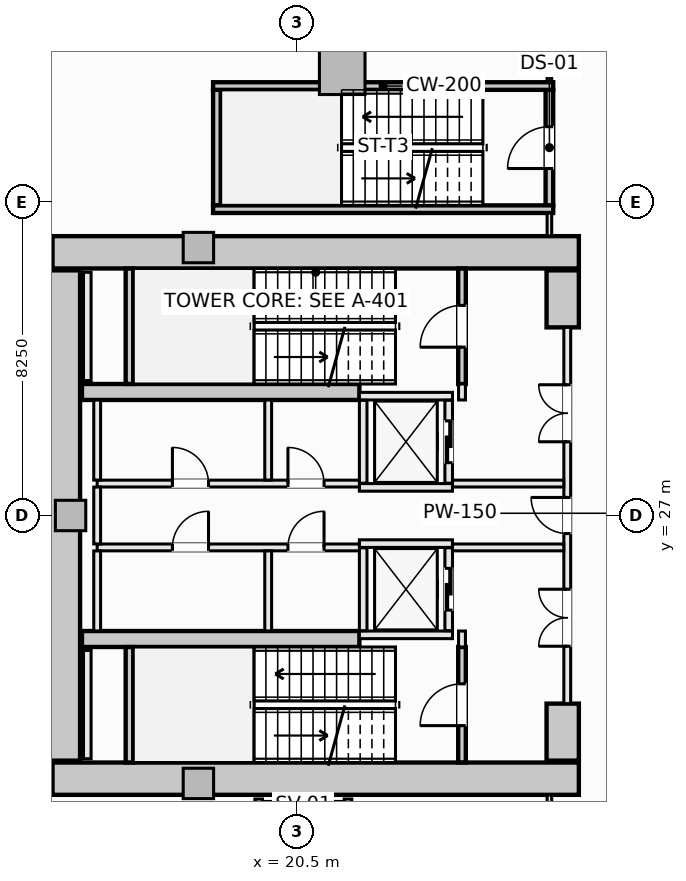
"""IFC4 building model, lengths in metres.
Left out: names, types, materials, properties, quantities, classifications, styles, units other than length and angle.
Written with IfcOpenShell. Run it as: python <this file> out.ifc"""

import sys

from ifc_helpers import new_model, si_unit, direction, frame, frame_2d, origin, origin_2d, place, context, subcontext, project, spatial, rectangle, extrude, element, fill, save


model = new_model("IFC4")
c1 = context("Model", 3, precision=1e-05, world=origin(), true_north=direction((0.0, 1.0)))
c2 = subcontext(c1, "Body", "Model", "MODEL_VIEW")
j1 = project(units=[si_unit("LENGTHUNIT", "METRE"), si_unit("PLANEANGLEUNIT", "RADIAN")], contexts=[c1])
p1 = place(None, origin())
s1 = spatial("IfcSite", under=j1, at=p1, CompositionType="ELEMENT")
p2 = place(p1, origin())
s2 = spatial("IfcBuilding", under=s1, at=p2, CompositionType="ELEMENT")
p3 = place(p2, frame((0.0, 0.0, -13.5)))
s3 = spatial("IfcBuildingStorey", under=s2, at=p3, CompositionType="ELEMENT", Elevation=-13.5)
for number, where, z_axis, x_axis in (
    (1, (14.075, 33.925, -0.5), (0.0, 0.0, 1.0), (1.0, 0.0, 0.0)),
    (2, (14.075, 20.075, -0.5), (0.0, 0.0, 1.0), (1.0, 0.0, 0.0)),
):
    element("IfcWall", number, at=place(p3, frame(where, z_axis=z_axis, x_axis=x_axis)), inside=s3, PredefinedType="SHEAR", context=c2, shape_type="SweptSolid", body=[
        extrude(rectangle(XDim=13.85, YDim=0.85, at=frame_2d((6.925, 0.0))), origin(), (0.0, 0.0, 1.0), 4.68),
    ])
p4 = place(p3, frame((14.375, 20.55, -0.5), z_axis=(0.0, 0.0, 1.0), x_axis=(0.0, 1.0, 0.0)))
e3 = element("IfcWall", 3, at=p4, inside=s3, PredefinedType="SHEAR", context=c2, shape_type="SweptSolid", body=[
    extrude(rectangle(XDim=12.9, YDim=0.85, at=frame_2d((6.45, 0.0))), origin(), (0.0, 0.0, 1.0), 4.68),
])
for number, where, z_axis, x_axis in (
    (4, (27.5, 31.95, -0.5), (0.0, 0.0, 1.0), (0.0, 1.0, 0.0)),
    (5, (27.5, 20.55, -0.5), (0.0, 0.0, 1.0), (0.0, 1.0, 0.0)),
):
    element("IfcWall", number, at=place(p3, frame(where, z_axis=z_axis, x_axis=x_axis)), inside=s3, PredefinedType="SHEAR", context=c2, shape_type="SweptSolid", body=[
        extrude(rectangle(XDim=1.5, YDim=0.85, at=frame_2d((0.75, 0.0))), origin(), (0.0, 0.0, 1.0), 4.68),
    ])
for number, where, z_axis, x_axis in (
    (6, (14.85, 30.25, -0.5), (0.0, 0.0, 1.0), (1.0, 0.0, 0.0)),
    (7, (14.85, 23.75, -0.5), (0.0, 0.0, 1.0), (1.0, 0.0, 0.0)),
):
    element("IfcWall", number, at=place(p3, frame(where, z_axis=z_axis, x_axis=x_axis)), inside=s3, PredefinedType="SHEAR", context=c2, shape_type="SweptSolid", body=[
        extrude(rectangle(XDim=7.3, YDim=0.42, at=frame_2d((3.65, 0.0))), origin(), (0.0, 0.0, 1.0), 4.68),
    ])
p5 = place(p3, frame((21.698, 38.677, -0.5), z_axis=(0.0, 0.0, 1.0), x_axis=(1.0, 0.0, 0.0)))
e8 = element("IfcColumn", 8, at=p5, inside=s3, PredefinedType="COLUMN", context=c2, shape_type="SweptSolid", body=[
    extrude(rectangle(XDim=1.2, YDim=1.2, at=origin_2d()), origin(), (0.0, 0.0, 1.0), 4.68),
])
for number, where, z_axis, x_axis in (
    (9, (17.914, 34.05, -0.5), (0.0, 0.0, 1.0), (1.0, 0.0, 0.0)),
    (10, (14.55, 27.0, -0.5), (0.0, 0.0, 1.0), (1.0, 0.0, 0.0)),
    (11, (17.914, 19.95, -0.5), (0.0, 0.0, 1.0), (1.0, 0.0, 0.0)),
):
    element("IfcColumn", number, at=place(p3, frame(where, z_axis=z_axis, x_axis=x_axis)), inside=s3, PredefinedType="PILASTER", context=c2, shape_type="SweptSolid", body=[
        extrude(rectangle(XDim=0.8, YDim=0.8, at=origin_2d()), origin(), (0.0, 0.0, 1.0), 4.68),
    ])
p6 = place(p3, frame((24.85, 30.46, -0.5), z_axis=(0.0, 0.0, 1.0), x_axis=(0.0, 1.0, 0.0)))
e12 = element("IfcWall", 12, at=p6, inside=s3, PredefinedType="SHEAR", context=c2, shape_type="SweptSolid", body=[
    extrude(rectangle(XDim=3.038, YDim=0.2, at=frame_2d((1.519, 0.0))), origin(), (0.0, 0.0, 1.0), 4.68),
])
p7 = place(p6, frame((0.969, 0.0, 0.5)))
e13 = element("IfcOpeningElement", 13, at=p7, cuts=e12, PredefinedType="OPENING", context=c2, shape_type="SweptSolid", body=[
    extrude(rectangle(XDim=1.1, YDim=2.15, at=frame_2d((0.55, 1.075))), frame((0.0, 0.11, 0.0), z_axis=(0.0, -1.0, 0.0), x_axis=(1.0, 0.0, 0.0)), (0.0, 0.0, 1.0), 0.22),
])
p8 = place(p3, frame((16.1, 30.462, -0.5), z_axis=(0.0, 0.0, 1.0), x_axis=(0.0, 1.0, 0.0)))
e14 = element("IfcWall", 14, at=p8, inside=s3, PredefinedType="SHEAR", context=c2, shape_type="SweptSolid", body=[
    extrude(rectangle(XDim=3.036, YDim=0.2, at=frame_2d((1.518, 0.0))), origin(), (0.0, 0.0, 1.0), 4.68),
])
p9 = place(p3, frame((24.85, 20.502, -0.5), z_axis=(0.0, 0.0, 1.0), x_axis=(0.0, 1.0, 0.0)))
e15 = element("IfcWall", 15, at=p9, inside=s3, PredefinedType="SHEAR", context=c2, shape_type="SweptSolid", body=[
    extrude(rectangle(XDim=3.038, YDim=0.2, at=frame_2d((1.519, 0.0))), origin(), (0.0, 0.0, 1.0), 4.68),
])
p10 = place(p9, frame((0.969, 0.0, 0.5)))
e16 = element("IfcOpeningElement", 16, at=p10, cuts=e15, PredefinedType="OPENING", context=c2, shape_type="SweptSolid", body=[
    extrude(rectangle(XDim=1.1, YDim=2.15, at=frame_2d((0.55, 1.075))), frame((0.0, 0.11, 0.0), z_axis=(0.0, -1.0, 0.0), x_axis=(1.0, 0.0, 0.0)), (0.0, 0.0, 1.0), 0.22),
])
p11 = place(p3, frame((16.1, 20.502, -0.5), z_axis=(0.0, 0.0, 1.0), x_axis=(0.0, 1.0, 0.0)))
e17 = element("IfcWall", 17, at=p11, inside=s3, PredefinedType="SHEAR", context=c2, shape_type="SweptSolid", body=[
    extrude(rectangle(XDim=3.036, YDim=0.2, at=frame_2d((1.518, 0.0))), origin(), (0.0, 0.0, 1.0), 4.68),
])
p12 = place(p3, frame((27.15, 35.16, -0.5), z_axis=(0.0, 0.0, 1.0), x_axis=(0.0, 1.0, 0.0)))
e18 = element("IfcWall", 18, at=p12, inside=s3, PredefinedType="SHEAR", context=c2, shape_type="SweptSolid", body=[
    extrude(rectangle(XDim=3.04, YDim=0.2, at=frame_2d((1.52, 0.0))), origin(), (0.0, 0.0, 1.0), 4.68),
])
p13 = place(p12, frame((0.97, 0.0, 0.5)))
e19 = element("IfcOpeningElement", 19, at=p13, cuts=e18, PredefinedType="OPENING", context=c2, shape_type="SweptSolid", body=[
    extrude(rectangle(XDim=1.1, YDim=2.15, at=frame_2d((0.55, 1.075))), frame((0.0, 0.11, 0.0), z_axis=(0.0, -1.0, 0.0), x_axis=(1.0, 0.0, 0.0)), (0.0, 0.0, 1.0), 0.22),
])
p14 = place(p3, frame((18.4, 35.16, -0.5), z_axis=(0.0, 0.0, 1.0), x_axis=(0.0, 1.0, 0.0)))
e20 = element("IfcWall", 20, at=p14, inside=s3, PredefinedType="SHEAR", context=c2, shape_type="SweptSolid", body=[
    extrude(rectangle(XDim=3.04, YDim=0.2, at=frame_2d((1.52, 0.0))), origin(), (0.0, 0.0, 1.0), 4.68),
])
for number, where, z_axis, x_axis in (
    (21, (18.3, 38.3, -0.5), (0.0, 0.0, 1.0), (1.0, 0.0, 0.0)),
    (22, (18.3, 35.06, -0.5), (0.0, 0.0, 1.0), (1.0, 0.0, 0.0)),
):
    element("IfcWall", number, at=place(p3, frame(where, z_axis=z_axis, x_axis=x_axis)), inside=s3, PredefinedType="SHEAR", context=c2, shape_type="SweptSolid", body=[
        extrude(rectangle(XDim=8.95, YDim=0.2, at=frame_2d((4.475, 0.0))), origin(), (0.0, 0.0, 1.0), 4.68),
    ])
for number, where, z_axis, x_axis in (
    (23, (22.15, 30.14, 0.0), (0.0, 0.0, 1.0), (1.0, 0.0, 0.0)),
    (24, (22.15, 27.74, 0.0), (0.0, 0.0, 1.0), (1.0, 0.0, 0.0)),
):
    element("IfcWall", number, at=place(p3, frame(where, z_axis=z_axis, x_axis=x_axis)), inside=s3, PredefinedType="SOLIDWALL", context=c2, shape_type="SweptSolid", body=[
        extrude(rectangle(XDim=2.45, YDim=0.2, at=frame_2d((1.225, 0.0))), origin(), (0.0, 0.0, 1.0), 4.18),
    ])
p15 = place(p3, frame((22.25, 27.85, 0.0), z_axis=(0.0, 0.0, 1.0), x_axis=(0.0, 1.0, 0.0)))
e25 = element("IfcWall", 25, at=p15, inside=s3, PredefinedType="SOLIDWALL", context=c2, shape_type="SweptSolid", body=[
    extrude(rectangle(XDim=2.18, YDim=0.2, at=frame_2d((1.09, 0.0))), origin(), (0.0, 0.0, 1.0), 4.18),
])
p16 = place(p3, frame((24.5, 27.85, 0.0), z_axis=(0.0, 0.0, 1.0), x_axis=(0.0, 1.0, 0.0)))
e26 = element("IfcWall", 26, at=p16, inside=s3, PredefinedType="SOLIDWALL", context=c2, shape_type="SweptSolid", body=[
    extrude(rectangle(XDim=2.18, YDim=0.2, at=frame_2d((1.09, 0.0))), origin(), (0.0, 0.0, 1.0), 4.18),
])
p17 = place(p16, frame((0.54, 0.0, 0.0)))
e27 = element("IfcOpeningElement", 27, at=p17, cuts=e26, PredefinedType="OPENING", context=c2, shape_type="SweptSolid", body=[
    extrude(rectangle(XDim=1.1, YDim=2.2, at=frame_2d((0.55, 1.1))), frame((0.0, 0.11, 0.0), z_axis=(0.0, -1.0, 0.0), x_axis=(1.0, 0.0, 0.0)), (0.0, 0.0, 1.0), 0.22),
])
for number, where, z_axis, x_axis in (
    (28, (22.15, 26.26, 0.0), (0.0, 0.0, 1.0), (1.0, 0.0, 0.0)),
    (29, (22.15, 23.86, 0.0), (0.0, 0.0, 1.0), (1.0, 0.0, 0.0)),
):
    element("IfcWall", number, at=place(p3, frame(where, z_axis=z_axis, x_axis=x_axis)), inside=s3, PredefinedType="SOLIDWALL", context=c2, shape_type="SweptSolid", body=[
        extrude(rectangle(XDim=2.45, YDim=0.2, at=frame_2d((1.225, 0.0))), origin(), (0.0, 0.0, 1.0), 4.18),
    ])
p18 = place(p3, frame((22.25, 23.97, 0.0), z_axis=(0.0, 0.0, 1.0), x_axis=(0.0, 1.0, 0.0)))
e30 = element("IfcWall", 30, at=p18, inside=s3, PredefinedType="SOLIDWALL", context=c2, shape_type="SweptSolid", body=[
    extrude(rectangle(XDim=2.18, YDim=0.2, at=frame_2d((1.09, 0.0))), origin(), (0.0, 0.0, 1.0), 4.18),
])
p19 = place(p3, frame((24.5, 23.97, 0.0), z_axis=(0.0, 0.0, 1.0), x_axis=(0.0, 1.0, 0.0)))
e31 = element("IfcWall", 31, at=p19, inside=s3, PredefinedType="SOLIDWALL", context=c2, shape_type="SweptSolid", body=[
    extrude(rectangle(XDim=2.18, YDim=0.2, at=frame_2d((1.09, 0.0))), origin(), (0.0, 0.0, 1.0), 4.18),
])
p20 = place(p19, frame((0.54, 0.0, 0.0)))
e32 = element("IfcOpeningElement", 32, at=p20, cuts=e31, PredefinedType="OPENING", context=c2, shape_type="SweptSolid", body=[
    extrude(rectangle(XDim=1.1, YDim=2.2, at=frame_2d((0.55, 1.1))), frame((0.0, 0.11, 0.0), z_axis=(0.0, -1.0, 0.0), x_axis=(1.0, 0.0, 0.0)), (0.0, 0.0, 1.0), 0.22),
])
for number, where, z_axis, x_axis in (
    (33, (19.5, 17.01, 0.0), (0.0, 0.0, 1.0), (0.0, 1.0, 0.0)),
    (34, (21.85, 17.01, 0.0), (0.0, 0.0, 1.0), (0.0, 1.0, 0.0)),
):
    element("IfcWall", number, at=place(p3, frame(where, z_axis=z_axis, x_axis=x_axis)), inside=s3, PredefinedType="SOLIDWALL", context=c2, shape_type="SweptSolid", body=[
        extrude(rectangle(XDim=2.53, YDim=0.2, at=frame_2d((1.265, 0.0))), origin(), (0.0, 0.0, 1.0), 4.18),
    ])
for number, where, z_axis, x_axis in (
    (35, (14.99, 30.55, 0.0), (0.0, 0.0, 1.0), (0.0, 1.0, 0.0)),
    (36, (14.99, 20.6, 0.0), (0.0, 0.0, 1.0), (0.0, 1.0, 0.0)),
):
    element("IfcWall", number, at=place(p3, frame(where, z_axis=z_axis, x_axis=x_axis)), inside=s3, PredefinedType="SOLIDWALL", context=c2, shape_type="SweptSolid", body=[
        extrude(rectangle(XDim=2.85, YDim=0.2, at=frame_2d((1.425, 0.0))), origin(), (0.0, 0.0, 1.0), 4.18),
    ])
for number, where, z_axis, x_axis in (
    (37, (24.85, 23.54, 0.0), (0.0, 0.0, 1.0), (0.0, 1.0, 0.0)),
    (38, (24.85, 30.04, 0.0), (0.0, 0.0, 1.0), (0.0, 1.0, 0.0)),
):
    element("IfcWall", number, at=place(p3, frame(where, z_axis=z_axis, x_axis=x_axis)), inside=s3, PredefinedType="SOLIDWALL", context=c2, shape_type="SweptSolid", body=[
        extrude(rectangle(XDim=0.42, YDim=0.18, at=frame_2d((0.21, 0.0))), origin(), (0.0, 0.0, 1.0), 4.18),
    ])
p21 = place(p3, frame((27.62, 22.05, 0.0), z_axis=(0.0, 0.0, 1.0), x_axis=(0.0, 1.0, 0.0)))
e39 = element("IfcWall", 39, at=p21, inside=s3, PredefinedType="SOLIDWALL", context=c2, shape_type="SweptSolid", body=[
    extrude(rectangle(XDim=9.9, YDim=0.18, at=frame_2d((4.95, 0.0))), origin(), (0.0, 0.0, 1.0), 3.272),
])
p22 = place(p21, frame((4.475, 0.0, 0.0)))
e40 = element("IfcOpeningElement", 40, at=p22, cuts=e39, PredefinedType="OPENING", context=c2, shape_type="SweptSolid", body=[
    extrude(rectangle(XDim=0.95, YDim=2.1, at=frame_2d((0.475, 1.05))), frame((0.0, 0.1, 0.0), z_axis=(0.0, -1.0, 0.0), x_axis=(1.0, 0.0, 0.0)), (0.0, 0.0, 1.0), 0.2),
])
p23 = place(p21, frame((6.89, 0.0, 0.0)))
e41 = element("IfcOpeningElement", 41, at=p23, cuts=e39, PredefinedType="OPENING", context=c2, shape_type="SweptSolid", body=[
    extrude(rectangle(XDim=1.5, YDim=2.2, at=frame_2d((0.75, 1.1))), frame((0.0, 0.1, 0.0), z_axis=(0.0, -1.0, 0.0), x_axis=(1.0, 0.0, 0.0)), (0.0, 0.0, 1.0), 0.2),
])
p24 = place(p21, frame((1.51, 0.0, 0.0)))
e42 = element("IfcOpeningElement", 42, at=p24, cuts=e39, PredefinedType="OPENING", context=c2, shape_type="SweptSolid", body=[
    extrude(rectangle(XDim=1.5, YDim=2.2, at=frame_2d((0.75, 1.1))), frame((0.0, 0.1, 0.0), z_axis=(0.0, -1.0, 0.0), x_axis=(1.0, 0.0, 0.0)), (0.0, 0.0, 1.0), 0.2),
])
p25 = place(p3, frame((15.25, 27.84, 0.0), z_axis=(0.0, 0.0, 1.0), x_axis=(1.0, 0.0, 0.0)))
e43 = element("IfcWall", 43, at=p25, inside=s3, PredefinedType="SOLIDWALL", context=c2, shape_type="SweptSolid", body=[
    extrude(rectangle(XDim=6.9, YDim=0.18, at=frame_2d((3.45, 0.0))), origin(), (0.0, 0.0, 1.0), 4.18),
])
p26 = place(p25, frame((5.02, 0.0, 0.0)))
e44 = element("IfcOpeningElement", 44, at=p26, cuts=e43, PredefinedType="OPENING", context=c2, shape_type="SweptSolid", body=[
    extrude(rectangle(XDim=0.95, YDim=2.1, at=frame_2d((0.475, 1.05))), frame((0.0, 0.1, 0.0), z_axis=(0.0, -1.0, 0.0), x_axis=(1.0, 0.0, 0.0)), (0.0, 0.0, 1.0), 0.2),
])
p27 = place(p25, frame((1.98, 0.0, 0.0)))
e45 = element("IfcOpeningElement", 45, at=p27, cuts=e43, PredefinedType="OPENING", context=c2, shape_type="SweptSolid", body=[
    extrude(rectangle(XDim=0.95, YDim=2.1, at=frame_2d((0.475, 1.05))), frame((0.0, 0.1, 0.0), z_axis=(0.0, -1.0, 0.0), x_axis=(1.0, 0.0, 0.0)), (0.0, 0.0, 1.0), 0.2),
])
p28 = place(p3, frame((24.6, 27.84, 0.0), z_axis=(0.0, 0.0, 1.0), x_axis=(1.0, 0.0, 0.0)))
e46 = element("IfcWall", 46, at=p28, inside=s3, PredefinedType="SOLIDWALL", context=c2, shape_type="SweptSolid", body=[
    extrude(rectangle(XDim=2.928, YDim=0.18, at=frame_2d((1.464, 0.0))), origin(), (0.0, 0.0, 1.0), 4.18),
])
p29 = place(p3, frame((15.25, 26.16, 0.0), z_axis=(0.0, 0.0, 1.0), x_axis=(1.0, 0.0, 0.0)))
e47 = element("IfcWall", 47, at=p29, inside=s3, PredefinedType="SOLIDWALL", context=c2, shape_type="SweptSolid", body=[
    extrude(rectangle(XDim=6.9, YDim=0.18, at=frame_2d((3.45, 0.0))), origin(), (0.0, 0.0, 1.0), 4.18),
])
p30 = place(p29, frame((5.02, 0.0, 0.0)))
e48 = element("IfcOpeningElement", 48, at=p30, cuts=e47, PredefinedType="OPENING", context=c2, shape_type="SweptSolid", body=[
    extrude(rectangle(XDim=0.95, YDim=2.1, at=frame_2d((0.475, 1.05))), frame((0.0, 0.1, 0.0), z_axis=(0.0, -1.0, 0.0), x_axis=(1.0, 0.0, 0.0)), (0.0, 0.0, 1.0), 0.2),
])
p31 = place(p29, frame((1.98, 0.0, 0.0)))
e49 = element("IfcOpeningElement", 49, at=p31, cuts=e47, PredefinedType="OPENING", context=c2, shape_type="SweptSolid", body=[
    extrude(rectangle(XDim=0.95, YDim=2.1, at=frame_2d((0.475, 1.05))), frame((0.0, 0.1, 0.0), z_axis=(0.0, -1.0, 0.0), x_axis=(1.0, 0.0, 0.0)), (0.0, 0.0, 1.0), 0.2),
])
p32 = place(p3, frame((24.6, 26.16, 0.0), z_axis=(0.0, 0.0, 1.0), x_axis=(1.0, 0.0, 0.0)))
e50 = element("IfcWall", 50, at=p32, inside=s3, PredefinedType="SOLIDWALL", context=c2, shape_type="SweptSolid", body=[
    extrude(rectangle(XDim=2.928, YDim=0.18, at=frame_2d((1.464, 0.0))), origin(), (0.0, 0.0, 1.0), 4.18),
])
p33 = place(p3, frame((15.25, 23.962, 0.0), z_axis=(0.0, 0.0, 1.0), x_axis=(0.0, 1.0, 0.0)))
e51 = element("IfcWall", 51, at=p33, inside=s3, PredefinedType="SOLIDWALL", context=c2, shape_type="SweptSolid", body=[
    extrude(rectangle(XDim=2.106, YDim=0.18, at=frame_2d((1.053, 0.0))), origin(), (0.0, 0.0, 1.0), 4.18),
])
p34 = place(p3, frame((15.25, 26.252, 0.0), z_axis=(0.0, 0.0, 1.0), x_axis=(0.0, 1.0, 0.0)))
e52 = element("IfcWall", 52, at=p34, inside=s3, PredefinedType="SOLIDWALL", context=c2, shape_type="SweptSolid", body=[
    extrude(rectangle(XDim=1.496, YDim=0.18, at=frame_2d((0.748, 0.0))), origin(), (0.0, 0.0, 1.0), 4.18),
])
for number, where, z_axis, x_axis in (
    (53, (15.25, 27.932, 0.0), (0.0, 0.0, 1.0), (0.0, 1.0, 0.0)),
    (54, (19.75, 23.962, 0.0), (0.0, 0.0, 1.0), (0.0, 1.0, 0.0)),
    (55, (19.75, 27.932, 0.0), (0.0, 0.0, 1.0), (0.0, 1.0, 0.0)),
):
    element("IfcWall", number, at=place(p3, frame(where, z_axis=z_axis, x_axis=x_axis)), inside=s3, PredefinedType="SOLIDWALL", context=c2, shape_type="SweptSolid", body=[
        extrude(rectangle(XDim=2.106, YDim=0.18, at=frame_2d((1.053, 0.0))), origin(), (0.0, 0.0, 1.0), 4.18),
    ])
p35 = place(p3, frame((27.15, 17.112, 0.0), z_axis=(0.0, 0.0, 1.0), x_axis=(0.0, 1.0, 0.0)))
e56 = element("IfcWall", 56, at=p35, inside=s3, PredefinedType="PARTITIONING", context=c2, shape_type="SweptSolid", body=[
    extrude(rectangle(XDim=2.536, YDim=0.12, at=frame_2d((1.268, 0.0))), origin(), (0.0, 0.0, 1.0), 4.18),
])
p36 = place(p3, frame((27.15, 34.352, 0.0), z_axis=(0.0, 0.0, 1.0), x_axis=(0.0, 1.0, 0.0)))
e57 = element("IfcWall", 57, at=p36, inside=s3, PredefinedType="PARTITIONING", context=c2, shape_type="SweptSolid", body=[
    extrude(rectangle(XDim=0.606, YDim=0.12, at=frame_2d((0.303, 0.0))), origin(), (0.0, 0.0, 1.0), 4.18),
])
p37 = place(p3, frame((27.15, 38.402, 0.0), z_axis=(0.0, 0.0, 1.0), x_axis=(0.0, 1.0, 0.0)))
e58 = element("IfcWall", 58, at=p37, inside=s3, PredefinedType="PARTITIONING", context=c2, shape_type="SweptSolid", body=[
    extrude(rectangle(XDim=12.398, YDim=0.12, at=frame_2d((6.199, 0.0))), origin(), (0.0, 0.0, 1.0), 4.18),
])
p38 = place(p37, frame((4.629, 0.0, 0.0)))
e59 = element("IfcOpeningElement", 59, at=p38, cuts=e58, PredefinedType="OPENING", context=c2, shape_type="SweptSolid", body=[
    extrude(rectangle(XDim=0.95, YDim=2.1, at=frame_2d((0.475, 1.05))), frame((0.0, 0.07, 0.0), z_axis=(0.0, -1.0, 0.0), x_axis=(1.0, 0.0, 0.0)), (0.0, 0.0, 1.0), 0.14),
])
p39 = place(p7, origin())
e60 = element("IfcDoor", 60, at=p39, inside=s3, OperationType="SINGLE_SWING_LEFT", PredefinedType="DOOR", context=c2, shape_type="SweptSolid", body=[
    extrude(rectangle(XDim=1.1, YDim=2.15, at=frame_2d((0.55, 1.075))), frame((0.0, 0.025, 0.0), z_axis=(0.0, -1.0, 0.0), x_axis=(1.0, 0.0, 0.0)), (0.0, 0.0, 1.0), 0.05),
])
fill(e13, e60)
p40 = place(p10, origin())
e61 = element("IfcDoor", 61, at=p40, inside=s3, OperationType="SINGLE_SWING_LEFT", PredefinedType="DOOR", context=c2, shape_type="SweptSolid", body=[
    extrude(rectangle(XDim=1.1, YDim=2.15, at=frame_2d((0.55, 1.075))), frame((0.0, 0.025, 0.0), z_axis=(0.0, -1.0, 0.0), x_axis=(1.0, 0.0, 0.0)), (0.0, 0.0, 1.0), 0.05),
])
fill(e16, e61)
p41 = place(p13, origin())
e62 = element("IfcDoor", 62, at=p41, inside=s3, OperationType="SINGLE_SWING_LEFT", PredefinedType="DOOR", context=c2, shape_type="SweptSolid", body=[
    extrude(rectangle(XDim=1.1, YDim=2.15, at=frame_2d((0.55, 1.075))), frame((0.0, 0.025, 0.0), z_axis=(0.0, -1.0, 0.0), x_axis=(1.0, 0.0, 0.0)), (0.0, 0.0, 1.0), 0.05),
])
fill(e19, e62)
p42 = place(p17, origin())
e63 = element("IfcDoor", 63, at=p42, inside=s3, OperationType="SLIDING_TO_LEFT", PredefinedType="DOOR", context=c2, shape_type="SweptSolid", body=[
    extrude(rectangle(XDim=1.1, YDim=2.2, at=frame_2d((0.55, 1.1))), frame((0.0, 0.025, 0.0), z_axis=(0.0, -1.0, 0.0), x_axis=(1.0, 0.0, 0.0)), (0.0, 0.0, 1.0), 0.05),
])
fill(e27, e63)
p43 = place(p20, origin())
e64 = element("IfcDoor", 64, at=p43, inside=s3, OperationType="SLIDING_TO_LEFT", PredefinedType="DOOR", context=c2, shape_type="SweptSolid", body=[
    extrude(rectangle(XDim=1.1, YDim=2.2, at=frame_2d((0.55, 1.1))), frame((0.0, 0.025, 0.0), z_axis=(0.0, -1.0, 0.0), x_axis=(1.0, 0.0, 0.0)), (0.0, 0.0, 1.0), 0.05),
])
fill(e32, e64)
p44 = place(p22, origin())
e65 = element("IfcDoor", 65, at=p44, inside=s3, OperationType="SINGLE_SWING_RIGHT", PredefinedType="DOOR", context=c2, shape_type="SweptSolid", body=[
    extrude(rectangle(XDim=0.95, YDim=2.1, at=frame_2d((0.475, 1.05))), frame((0.0, 0.025, 0.0), z_axis=(0.0, -1.0, 0.0), x_axis=(1.0, 0.0, 0.0)), (0.0, 0.0, 1.0), 0.05),
])
fill(e40, e65)
p45 = place(p23, origin())
e66 = element("IfcDoor", 66, at=p45, inside=s3, OperationType="DOUBLE_DOOR_SINGLE_SWING", PredefinedType="DOOR", context=c2, shape_type="SweptSolid", body=[
    extrude(rectangle(XDim=1.5, YDim=2.2, at=frame_2d((0.75, 1.1))), frame((0.0, 0.025, 0.0), z_axis=(0.0, -1.0, 0.0), x_axis=(1.0, 0.0, 0.0)), (0.0, 0.0, 1.0), 0.05),
])
fill(e41, e66)
p46 = place(p24, origin())
e67 = element("IfcDoor", 67, at=p46, inside=s3, OperationType="DOUBLE_DOOR_SINGLE_SWING", PredefinedType="DOOR", context=c2, shape_type="SweptSolid", body=[
    extrude(rectangle(XDim=1.5, YDim=2.2, at=frame_2d((0.75, 1.1))), frame((0.0, 0.025, 0.0), z_axis=(0.0, -1.0, 0.0), x_axis=(1.0, 0.0, 0.0)), (0.0, 0.0, 1.0), 0.05),
])
fill(e42, e67)
p47 = place(p26, origin())
e68 = element("IfcDoor", 68, at=p47, inside=s3, OperationType="SINGLE_SWING_LEFT", PredefinedType="DOOR", context=c2, shape_type="SweptSolid", body=[
    extrude(rectangle(XDim=0.95, YDim=2.1, at=frame_2d((0.475, 1.05))), frame((0.0, 0.025, 0.0), z_axis=(0.0, -1.0, 0.0), x_axis=(1.0, 0.0, 0.0)), (0.0, 0.0, 1.0), 0.05),
])
fill(e44, e68)
p48 = place(p30, origin())
e69 = element("IfcDoor", 69, at=p48, inside=s3, OperationType="SINGLE_SWING_RIGHT", PredefinedType="DOOR", context=c2, shape_type="SweptSolid", body=[
    extrude(rectangle(XDim=0.95, YDim=2.1, at=frame_2d((0.475, 1.05))), frame((0.0, 0.025, 0.0), z_axis=(0.0, -1.0, 0.0), x_axis=(1.0, 0.0, 0.0)), (0.0, 0.0, 1.0), 0.05),
])
fill(e48, e69)
p49 = place(p27, origin())
e70 = element("IfcDoor", 70, at=p49, inside=s3, OperationType="SINGLE_SWING_LEFT", PredefinedType="DOOR", context=c2, shape_type="SweptSolid", body=[
    extrude(rectangle(XDim=0.95, YDim=2.1, at=frame_2d((0.475, 1.05))), frame((0.0, 0.025, 0.0), z_axis=(0.0, -1.0, 0.0), x_axis=(1.0, 0.0, 0.0)), (0.0, 0.0, 1.0), 0.05),
])
fill(e45, e70)
p50 = place(p31, origin())
e71 = element("IfcDoor", 71, at=p50, inside=s3, OperationType="SINGLE_SWING_RIGHT", PredefinedType="DOOR", context=c2, shape_type="SweptSolid", body=[
    extrude(rectangle(XDim=0.95, YDim=2.1, at=frame_2d((0.475, 1.05))), frame((0.0, 0.025, 0.0), z_axis=(0.0, -1.0, 0.0), x_axis=(1.0, 0.0, 0.0)), (0.0, 0.0, 1.0), 0.05),
])
fill(e49, e71)
save(model, sys.argv[1])
